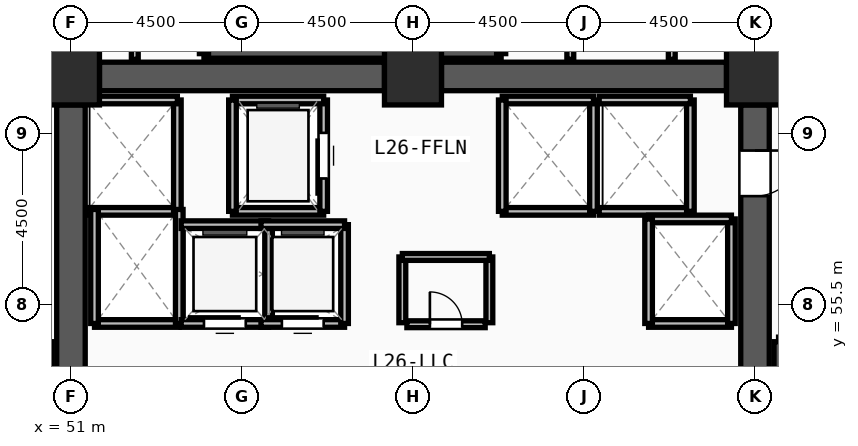
"""IFC4 building model, lengths in metres.
Left out: names, types, materials, properties, quantities, classifications, styles, units other than length and angle.
Written with IfcOpenShell. Run it as: python <this file> out.ifc"""

import sys

from ifc_helpers import new_model, si_unit, direction, frame, frame_2d, origin, origin_2d, place, context, subcontext, project, spatial, rectangle, extrude, source, transform, mapped, element, fill, save


model = new_model("IFC4")
c1 = context("Model", 3, precision=1e-05, world=origin(), true_north=direction((0.0, 1.0)))
c2 = subcontext(c1, "Body", "Model", "MODEL_VIEW")
j1 = project(units=[si_unit("LENGTHUNIT", "METRE"), si_unit("PLANEANGLEUNIT", "RADIAN")], contexts=[c1])
p1 = place(None, origin())
s1 = spatial("IfcSite", under=j1, at=p1, CompositionType="ELEMENT")
p2 = place(p1, origin())
s2 = spatial("IfcBuilding", under=s1, at=p2, CompositionType="ELEMENT")
p3 = place(p2, frame((0.0, 0.0, 102.0)))
s3 = spatial("IfcBuildingStorey", under=s2, at=p3, CompositionType="ELEMENT", Elevation=102.0)
m1 = source(origin(), c2, "Body", "SweptSolid", [
    extrude(rectangle(XDim=1.5, YDim=1.5, at=origin_2d()), origin(), (0.0, 0.0, 1.0), 3.75),
])
for number, where, z_axis, x_axis in (
    (1, (69.0, 61.5, 0.0), (0.0, 0.0, 1.0), (1.0, 0.0, 0.0)),
    (2, (60.0, 61.5, 0.0), (0.0, 0.0, 1.0), (1.0, 0.0, 0.0)),
    (3, (51.0, 61.5, 0.0), (0.0, 0.0, 1.0), (1.0, 0.0, 0.0)),
):
    element("IfcColumn", number, at=place(p3, frame(where, z_axis=z_axis, x_axis=x_axis)), inside=s3, PredefinedType="COLUMN", context=c2, shape_type="MappedRepresentation", body=[
        mapped(m1, transform((0.0, 0.0, 0.0), x_axis=(1.0, 0.0, 0.0), y_axis=(0.0, 1.0, 0.0), z_axis=(0.0, 0.0, 1.0), scale=1.0)),
    ])
for number, where, z_axis, x_axis in (
    (4, (51.75, 61.5, 0.0), (0.0, 0.0, 1.0), (1.0, 0.0, 0.0)),
    (5, (60.75, 61.5, 0.0), (0.0, 0.0, 1.0), (1.0, 0.0, 0.0)),
):
    element("IfcWall", number, at=place(p3, frame(where, z_axis=z_axis, x_axis=x_axis)), inside=s3, PredefinedType="SHEAR", context=c2, shape_type="SweptSolid", body=[
        extrude(rectangle(XDim=7.5, YDim=0.75, at=frame_2d((3.75, 0.0))), origin(), (0.0, 0.0, 1.0), 3.57),
    ])
p4 = place(p3, frame((69.0, 60.75, 0.0), z_axis=(0.0, 0.0, 1.0), x_axis=(0.0, -1.0, 0.0)))
e6 = element("IfcWall", 6, at=p4, inside=s3, PredefinedType="SHEAR", context=c2, shape_type="SweptSolid", body=[
    extrude(rectangle(XDim=13.5, YDim=0.75, at=frame_2d((6.75, 0.0))), origin(), (0.0, 0.0, 1.0), 3.57),
])
m2 = source(origin(), c2, "Body", "SweptSolid", [
    extrude(rectangle(XDim=1.2, YDim=2.2, at=frame_2d((0.6, 1.1))), frame((0.0, 0.385, 0.0), z_axis=(0.0, -1.0, 0.0), x_axis=(1.0, 0.0, 0.0)), (0.0, 0.0, 1.0), 0.77),
])
p5 = place(p4, frame((1.2, 0.0, 0.0)))
e7 = element("IfcOpeningElement", 7, at=p5, cuts=e6, PredefinedType="OPENING", context=c2, shape_type="MappedRepresentation", body=[
    mapped(m2, transform((0.0, 0.0, 0.0), x_axis=(1.0, 0.0, 0.0), y_axis=(0.0, 1.0, 0.0), z_axis=(0.0, 0.0, 1.0), scale=1.0)),
])
p6 = place(p3, frame((51.0, 47.25, 0.0), z_axis=(0.0, 0.0, 1.0), x_axis=(0.0, 1.0, 0.0)))
e8 = element("IfcWall", 8, at=p6, inside=s3, PredefinedType="SHEAR", context=c2, shape_type="SweptSolid", body=[
    extrude(rectangle(XDim=13.5, YDim=0.75, at=frame_2d((6.75, 0.0))), origin(), (0.0, 0.0, 1.0), 3.57),
])
for number, where, z_axis, x_axis in (
    (9, (69.62, 54.52, 0.0), (0.0, 0.0, 1.0), (0.0, -1.0, 0.0)),
    (10, (54.5, 62.1, 0.0), (0.0, 0.0, 1.0), (1.0, 0.0, 0.0)),
):
    element("IfcWall", number, at=place(p3, frame(where, z_axis=z_axis, x_axis=x_axis)), inside=s3, PredefinedType="SOLIDWALL", context=c2, shape_type="SweptSolid", body=[
        extrude(rectangle(XDim=7.82, YDim=0.24, at=frame_2d((3.91, 0.0))), origin(), (0.0, 0.0, 1.0), 3.57),
    ])
for number, where, z_axis, x_axis in (
    (11, (62.32, 62.1, 0.0), (0.0, 0.0, 1.0), (0.0, 1.0, 0.0)),
    (12, (54.5, 65.54, 0.0), (0.0, 0.0, 1.0), (0.0, -1.0, 0.0)),
):
    element("IfcWall", number, at=place(p3, frame(where, z_axis=z_axis, x_axis=x_axis)), inside=s3, PredefinedType="SOLIDWALL", context=c2, shape_type="SweptSolid", body=[
        extrude(rectangle(XDim=3.44, YDim=0.24, at=frame_2d((1.72, 0.0))), origin(), (0.0, 0.0, 1.0), 3.57),
    ])
p7 = place(p3, frame((55.25, 57.95, 0.0), z_axis=(0.0, 0.0, 1.0), x_axis=(1.0, 0.0, 0.0)))
e13 = element("IfcWall", 13, at=p7, inside=s3, PredefinedType="SOLIDWALL", context=c2, shape_type="SweptSolid", body=[
    extrude(rectangle(XDim=2.4, YDim=0.2, at=frame_2d((1.2, 0.0))), origin(), (0.0, 0.0, 1.0), 3.57),
])
p8 = place(p3, frame((57.65, 57.95, 0.0), z_axis=(0.0, 0.0, 1.0), x_axis=(0.0, 1.0, 0.0)))
e14 = element("IfcWall", 14, at=p8, inside=s3, PredefinedType="SOLIDWALL", context=c2, shape_type="SweptSolid", body=[
    extrude(rectangle(XDim=2.93, YDim=0.2, at=frame_2d((1.465, 0.0))), origin(), (0.0, 0.0, 1.0), 3.57),
])
m3 = source(origin(), c2, "Body", "SweptSolid", [
    extrude(rectangle(XDim=1.2, YDim=2.3, at=frame_2d((0.6, 1.15))), frame((0.0, 0.11, 0.0), z_axis=(0.0, -1.0, 0.0), x_axis=(1.0, 0.0, 0.0)), (0.0, 0.0, 1.0), 0.22),
])
p9 = place(p8, frame((0.865, 0.0, 0.0)))
e15 = element("IfcOpeningElement", 15, at=p9, cuts=e14, PredefinedType="OPENING", context=c2, shape_type="MappedRepresentation", body=[
    mapped(m3, transform((0.0, 0.0, 0.0), x_axis=(1.0, 0.0, 0.0), y_axis=(0.0, 1.0, 0.0), z_axis=(0.0, 0.0, 1.0), scale=1.0)),
])
p10 = place(p3, frame((57.65, 60.88, 0.0), z_axis=(0.0, 0.0, 1.0), x_axis=(-1.0, 0.0, 0.0)))
e16 = element("IfcWall", 16, at=p10, inside=s3, PredefinedType="SOLIDWALL", context=c2, shape_type="SweptSolid", body=[
    extrude(rectangle(XDim=2.4, YDim=0.2, at=frame_2d((1.2, 0.0))), origin(), (0.0, 0.0, 1.0), 3.57),
])
p11 = place(p3, frame((55.25, 60.88, 0.0), z_axis=(0.0, 0.0, 1.0), x_axis=(0.0, -1.0, 0.0)))
e17 = element("IfcWall", 17, at=p11, inside=s3, PredefinedType="SOLIDWALL", context=c2, shape_type="SweptSolid", body=[
    extrude(rectangle(XDim=2.93, YDim=0.2, at=frame_2d((1.465, 0.0))), origin(), (0.0, 0.0, 1.0), 3.57),
])
p12 = place(p3, frame((62.35, 57.95, 0.0), z_axis=(0.0, 0.0, 1.0), x_axis=(1.0, 0.0, 0.0)))
e18 = element("IfcWall", 18, at=p12, inside=s3, PredefinedType="SOLIDWALL", context=c2, shape_type="SweptSolid", body=[
    extrude(rectangle(XDim=2.4, YDim=0.2, at=frame_2d((1.2, 0.0))), origin(), (0.0, 0.0, 1.0), 3.57),
])
p13 = place(p3, frame((64.75, 57.95, 0.0), z_axis=(0.0, 0.0, 1.0), x_axis=(0.0, 1.0, 0.0)))
e19 = element("IfcWall", 19, at=p13, inside=s3, PredefinedType="SOLIDWALL", context=c2, shape_type="SweptSolid", body=[
    extrude(rectangle(XDim=2.93, YDim=0.2, at=frame_2d((1.465, 0.0))), origin(), (0.0, 0.0, 1.0), 3.57),
])
p14 = place(p3, frame((64.75, 60.88, 0.0), z_axis=(0.0, 0.0, 1.0), x_axis=(-1.0, 0.0, 0.0)))
e20 = element("IfcWall", 20, at=p14, inside=s3, PredefinedType="SOLIDWALL", context=c2, shape_type="SweptSolid", body=[
    extrude(rectangle(XDim=2.4, YDim=0.2, at=frame_2d((1.2, 0.0))), origin(), (0.0, 0.0, 1.0), 3.57),
])
p15 = place(p3, frame((62.35, 60.88, 0.0), z_axis=(0.0, 0.0, 1.0), x_axis=(0.0, -1.0, 0.0)))
e21 = element("IfcWall", 21, at=p15, inside=s3, PredefinedType="SOLIDWALL", context=c2, shape_type="SweptSolid", body=[
    extrude(rectangle(XDim=2.93, YDim=0.2, at=frame_2d((1.465, 0.0))), origin(), (0.0, 0.0, 1.0), 3.57),
])
p16 = place(p3, frame((64.9, 57.95, 0.0), z_axis=(0.0, 0.0, 1.0), x_axis=(1.0, 0.0, 0.0)))
e22 = element("IfcWall", 22, at=p16, inside=s3, PredefinedType="SOLIDWALL", context=c2, shape_type="SweptSolid", body=[
    extrude(rectangle(XDim=2.4, YDim=0.2, at=frame_2d((1.2, 0.0))), origin(), (0.0, 0.0, 1.0), 3.57),
])
p17 = place(p3, frame((67.3, 57.95, 0.0), z_axis=(0.0, 0.0, 1.0), x_axis=(0.0, 1.0, 0.0)))
e23 = element("IfcWall", 23, at=p17, inside=s3, PredefinedType="SOLIDWALL", context=c2, shape_type="SweptSolid", body=[
    extrude(rectangle(XDim=2.93, YDim=0.2, at=frame_2d((1.465, 0.0))), origin(), (0.0, 0.0, 1.0), 3.57),
])
for number, where, z_axis, x_axis in (
    (24, (67.3, 60.88, 0.0), (0.0, 0.0, 1.0), (-1.0, 0.0, 0.0)),
    (25, (51.4, 57.95, 0.0), (0.0, 0.0, 1.0), (1.0, 0.0, 0.0)),
):
    element("IfcWall", number, at=place(p3, frame(where, z_axis=z_axis, x_axis=x_axis)), inside=s3, PredefinedType="SOLIDWALL", context=c2, shape_type="SweptSolid", body=[
        extrude(rectangle(XDim=2.4, YDim=0.2, at=frame_2d((1.2, 0.0))), origin(), (0.0, 0.0, 1.0), 3.57),
    ])
p18 = place(p3, frame((53.8, 57.95, 0.0), z_axis=(0.0, 0.0, 1.0), x_axis=(0.0, 1.0, 0.0)))
e26 = element("IfcWall", 26, at=p18, inside=s3, PredefinedType="SOLIDWALL", context=c2, shape_type="SweptSolid", body=[
    extrude(rectangle(XDim=2.93, YDim=0.2, at=frame_2d((1.465, 0.0))), origin(), (0.0, 0.0, 1.0), 3.57),
])
p19 = place(p3, frame((53.8, 60.88, 0.0), z_axis=(0.0, 0.0, 1.0), x_axis=(-1.0, 0.0, 0.0)))
e27 = element("IfcWall", 27, at=p19, inside=s3, PredefinedType="SOLIDWALL", context=c2, shape_type="SweptSolid", body=[
    extrude(rectangle(XDim=2.4, YDim=0.2, at=frame_2d((1.2, 0.0))), origin(), (0.0, 0.0, 1.0), 3.57),
])
p20 = place(p3, frame((51.62, 55.0, 0.0), z_axis=(0.0, 0.0, 1.0), x_axis=(1.0, 0.0, 0.0)))
e28 = element("IfcWall", 28, at=p20, inside=s3, PredefinedType="SOLIDWALL", context=c2, shape_type="SweptSolid", body=[
    extrude(rectangle(XDim=2.23, YDim=0.2, at=frame_2d((1.115, 0.0))), origin(), (0.0, 0.0, 1.0), 3.57),
])
for number, where, z_axis, x_axis in (
    (29, (53.85, 55.0, 0.0), (0.0, 0.0, 1.0), (0.0, 1.0, 0.0)),
    (30, (51.62, 58.0, 0.0), (0.0, 0.0, 1.0), (0.0, -1.0, 0.0)),
):
    element("IfcWall", number, at=place(p3, frame(where, z_axis=z_axis, x_axis=x_axis)), inside=s3, PredefinedType="SOLIDWALL", context=c2, shape_type="SweptSolid", body=[
        extrude(rectangle(XDim=3.0, YDim=0.2, at=frame_2d((1.5, 0.0))), origin(), (0.0, 0.0, 1.0), 3.57),
    ])
p21 = place(p3, frame((66.2, 55.0, 0.0), z_axis=(0.0, 0.0, 1.0), x_axis=(1.0, 0.0, 0.0)))
e31 = element("IfcWall", 31, at=p21, inside=s3, PredefinedType="SOLIDWALL", context=c2, shape_type="SweptSolid", body=[
    extrude(rectangle(XDim=2.18, YDim=0.2, at=frame_2d((1.09, 0.0))), origin(), (0.0, 0.0, 1.0), 3.57),
])
p22 = place(p3, frame((68.38, 55.0, 0.0), z_axis=(0.0, 0.0, 1.0), x_axis=(0.0, 1.0, 0.0)))
e32 = element("IfcWall", 32, at=p22, inside=s3, PredefinedType="SOLIDWALL", context=c2, shape_type="SweptSolid", body=[
    extrude(rectangle(XDim=2.75, YDim=0.2, at=frame_2d((1.375, 0.0))), origin(), (0.0, 0.0, 1.0), 3.57),
])
p23 = place(p3, frame((68.38, 57.75, 0.0), z_axis=(0.0, 0.0, 1.0), x_axis=(-1.0, 0.0, 0.0)))
e33 = element("IfcWall", 33, at=p23, inside=s3, PredefinedType="SOLIDWALL", context=c2, shape_type="SweptSolid", body=[
    extrude(rectangle(XDim=2.18, YDim=0.2, at=frame_2d((1.09, 0.0))), origin(), (0.0, 0.0, 1.0), 3.57),
])
p24 = place(p3, frame((66.2, 57.75, 0.0), z_axis=(0.0, 0.0, 1.0), x_axis=(0.0, -1.0, 0.0)))
e34 = element("IfcWall", 34, at=p24, inside=s3, PredefinedType="SOLIDWALL", context=c2, shape_type="SweptSolid", body=[
    extrude(rectangle(XDim=2.75, YDim=0.2, at=frame_2d((1.375, 0.0))), origin(), (0.0, 0.0, 1.0), 3.57),
])
p25 = place(p3, frame((53.9, 55.0, 0.0), z_axis=(0.0, 0.0, 1.0), x_axis=(1.0, 0.0, 0.0)))
e35 = element("IfcWall", 35, at=p25, inside=s3, PredefinedType="SOLIDWALL", context=c2, shape_type="SweptSolid", body=[
    extrude(rectangle(XDim=2.3, YDim=0.2, at=frame_2d((1.15, 0.0))), origin(), (0.0, 0.0, 1.0), 3.57),
])
m4 = source(origin(), c2, "Body", "SweptSolid", [
    extrude(rectangle(XDim=1.1, YDim=2.2, at=frame_2d((0.55, 1.1))), frame((0.0, 0.11, 0.0), z_axis=(0.0, -1.0, 0.0), x_axis=(1.0, 0.0, 0.0)), (0.0, 0.0, 1.0), 0.22),
])
p26 = place(p25, frame((0.6, 0.0, 0.0)))
e36 = element("IfcOpeningElement", 36, at=p26, cuts=e35, PredefinedType="OPENING", context=c2, shape_type="MappedRepresentation", body=[
    mapped(m4, transform((0.0, 0.0, 0.0), x_axis=(1.0, 0.0, 0.0), y_axis=(0.0, 1.0, 0.0), z_axis=(0.0, 0.0, 1.0), scale=1.0)),
])
p27 = place(p3, frame((56.2, 55.0, 0.0), z_axis=(0.0, 0.0, 1.0), x_axis=(0.0, 1.0, 0.0)))
e37 = element("IfcWall", 37, at=p27, inside=s3, PredefinedType="SOLIDWALL", context=c2, shape_type="SweptSolid", body=[
    extrude(rectangle(XDim=2.6, YDim=0.2, at=frame_2d((1.3, 0.0))), origin(), (0.0, 0.0, 1.0), 3.57),
])
p28 = place(p3, frame((56.2, 57.6, 0.0), z_axis=(0.0, 0.0, 1.0), x_axis=(-1.0, 0.0, 0.0)))
e38 = element("IfcWall", 38, at=p28, inside=s3, PredefinedType="SOLIDWALL", context=c2, shape_type="SweptSolid", body=[
    extrude(rectangle(XDim=2.3, YDim=0.2, at=frame_2d((1.15, 0.0))), origin(), (0.0, 0.0, 1.0), 3.57),
])
p29 = place(p3, frame((56.0, 55.0, 0.0), z_axis=(0.0, 0.0, 1.0), x_axis=(1.0, 0.0, 0.0)))
e39 = element("IfcWall", 39, at=p29, inside=s3, PredefinedType="SOLIDWALL", context=c2, shape_type="SweptSolid", body=[
    extrude(rectangle(XDim=2.2, YDim=0.2, at=frame_2d((1.1, 0.0))), origin(), (0.0, 0.0, 1.0), 3.57),
])
p30 = place(p29, frame((0.55, 0.0, 0.0)))
e40 = element("IfcOpeningElement", 40, at=p30, cuts=e39, PredefinedType="OPENING", context=c2, shape_type="MappedRepresentation", body=[
    mapped(m4, transform((0.0, 0.0, 0.0), x_axis=(1.0, 0.0, 0.0), y_axis=(0.0, 1.0, 0.0), z_axis=(0.0, 0.0, 1.0), scale=1.0)),
])
p31 = place(p3, frame((58.2, 55.0, 0.0), z_axis=(0.0, 0.0, 1.0), x_axis=(0.0, 1.0, 0.0)))
e41 = element("IfcWall", 41, at=p31, inside=s3, PredefinedType="SOLIDWALL", context=c2, shape_type="SweptSolid", body=[
    extrude(rectangle(XDim=2.6, YDim=0.2, at=frame_2d((1.3, 0.0))), origin(), (0.0, 0.0, 1.0), 3.57),
])
p32 = place(p3, frame((58.2, 57.6, 0.0), z_axis=(0.0, 0.0, 1.0), x_axis=(-1.0, 0.0, 0.0)))
e42 = element("IfcWall", 42, at=p32, inside=s3, PredefinedType="SOLIDWALL", context=c2, shape_type="SweptSolid", body=[
    extrude(rectangle(XDim=2.2, YDim=0.2, at=frame_2d((1.1, 0.0))), origin(), (0.0, 0.0, 1.0), 3.57),
])
p33 = place(p3, frame((59.84, 54.98, 0.0), z_axis=(0.0, 0.0, 1.0), x_axis=(1.0, 0.0, 0.0)))
e43 = element("IfcWall", 43, at=p33, inside=s3, PredefinedType="PARTITIONING", context=c2, shape_type="SweptSolid", body=[
    extrude(rectangle(XDim=2.06, YDim=0.18, at=frame_2d((1.03, 0.0))), origin(), (0.0, 0.0, 1.0), 3.57),
])
m5 = source(origin(), c2, "Body", "SweptSolid", [
    extrude(rectangle(XDim=0.85, YDim=2.1, at=frame_2d((0.425, 1.05))), frame((0.0, 0.1, 0.0), z_axis=(0.0, -1.0, 0.0), x_axis=(1.0, 0.0, 0.0)), (0.0, 0.0, 1.0), 0.2),
])
p34 = place(p33, frame((0.605, 0.0, 0.0)))
e44 = element("IfcOpeningElement", 44, at=p34, cuts=e43, PredefinedType="OPENING", context=c2, shape_type="MappedRepresentation", body=[
    mapped(m5, transform((0.0, 0.0, 0.0), x_axis=(1.0, 0.0, 0.0), y_axis=(0.0, 1.0, 0.0), z_axis=(0.0, 0.0, 1.0), scale=1.0)),
])
for number, where, z_axis, x_axis in (
    (45, (59.72, 55.02, 0.0), (0.0, 0.0, 1.0), (0.0, 1.0, 0.0)),
    (46, (62.01, 55.02, 0.0), (0.0, 0.0, 1.0), (0.0, 1.0, 0.0)),
):
    element("IfcWall", number, at=place(p3, frame(where, z_axis=z_axis, x_axis=x_axis)), inside=s3, PredefinedType="PARTITIONING", context=c2, shape_type="SweptSolid", body=[
        extrude(rectangle(XDim=1.73, YDim=0.18, at=frame_2d((0.865, 0.0))), origin(), (0.0, 0.0, 1.0), 3.57),
    ])
p35 = place(p3, frame((59.72, 56.75, 0.0), z_axis=(0.0, 0.0, 1.0), x_axis=(1.0, 0.0, 0.0)))
e47 = element("IfcWall", 47, at=p35, inside=s3, PredefinedType="PARTITIONING", context=c2, shape_type="SweptSolid", body=[
    extrude(rectangle(XDim=2.29, YDim=0.18, at=frame_2d((1.145, 0.0))), origin(), (0.0, 0.0, 1.0), 3.57),
])
for number, where, z_axis, x_axis in (
    (48, (50.54, 61.95, 0.0), (0.0, 0.0, 1.0), (0.0, 1.0, 0.0)),
    (49, (52.68, 61.95, 0.0), (0.0, 0.0, 1.0), (0.0, 1.0, 0.0)),
    (50, (64.14, 61.95, 0.0), (0.0, 0.0, 1.0), (0.0, 1.0, 0.0)),
    (51, (66.81, 61.95, 0.0), (0.0, 0.0, 1.0), (0.0, 1.0, 0.0)),
):
    element("IfcWall", number, at=place(p3, frame(where, z_axis=z_axis, x_axis=x_axis)), inside=s3, PredefinedType="PARTITIONING", context=c2, shape_type="SweptSolid", body=[
        extrude(rectangle(XDim=3.63, YDim=0.18, at=frame_2d((1.815, 0.0))), origin(), (0.0, 0.0, 1.0), 3.57),
    ])
m6 = source(origin(), c2, "Body", "SweptSolid", [
    extrude(rectangle(XDim=1.2, YDim=2.2, at=frame_2d((0.6, 1.1))), frame((0.0, 0.025, 0.0), z_axis=(0.0, -1.0, 0.0), x_axis=(1.0, 0.0, 0.0)), (0.0, 0.0, 1.0), 0.05),
])
p36 = place(p5, origin())
e52 = element("IfcDoor", 52, at=p36, inside=s3, OperationType="SINGLE_SWING_LEFT", PredefinedType="DOOR", context=c2, shape_type="MappedRepresentation", body=[
    mapped(m6, transform((0.0, 0.0, 0.0), x_axis=(1.0, 0.0, 0.0), y_axis=(0.0, 1.0, 0.0), z_axis=(0.0, 0.0, 1.0), scale=1.0)),
])
fill(e7, e52)
m7 = source(origin(), c2, "Body", "SweptSolid", [
    extrude(rectangle(XDim=1.2, YDim=2.3, at=frame_2d((0.6, 1.15))), frame((0.0, 0.025, 0.0), z_axis=(0.0, -1.0, 0.0), x_axis=(1.0, 0.0, 0.0)), (0.0, 0.0, 1.0), 0.05),
])
p37 = place(p9, origin())
e53 = element("IfcDoor", 53, at=p37, inside=s3, OperationType="SLIDING_TO_LEFT", PredefinedType="DOOR", context=c2, shape_type="MappedRepresentation", body=[
    mapped(m7, transform((0.0, 0.0, 0.0), x_axis=(1.0, 0.0, 0.0), y_axis=(0.0, 1.0, 0.0), z_axis=(0.0, 0.0, 1.0), scale=1.0)),
])
fill(e15, e53)
m8 = source(origin(), c2, "Body", "SweptSolid", [
    extrude(rectangle(XDim=1.1, YDim=2.2, at=frame_2d((0.55, 1.1))), frame((0.0, 0.025, 0.0), z_axis=(0.0, -1.0, 0.0), x_axis=(1.0, 0.0, 0.0)), (0.0, 0.0, 1.0), 0.05),
])
p38 = place(p26, origin())
e54 = element("IfcDoor", 54, at=p38, inside=s3, OperationType="SLIDING_TO_LEFT", PredefinedType="DOOR", context=c2, shape_type="MappedRepresentation", body=[
    mapped(m8, transform((0.0, 0.0, 0.0), x_axis=(1.0, 0.0, 0.0), y_axis=(0.0, 1.0, 0.0), z_axis=(0.0, 0.0, 1.0), scale=1.0)),
])
fill(e36, e54)
p39 = place(p30, origin())
e55 = element("IfcDoor", 55, at=p39, inside=s3, OperationType="SLIDING_TO_LEFT", PredefinedType="DOOR", context=c2, shape_type="MappedRepresentation", body=[
    mapped(m8, transform((0.0, 0.0, 0.0), x_axis=(1.0, 0.0, 0.0), y_axis=(0.0, 1.0, 0.0), z_axis=(0.0, 0.0, 1.0), scale=1.0)),
])
fill(e40, e55)
m9 = source(origin(), c2, "Body", "SweptSolid", [
    extrude(rectangle(XDim=0.85, YDim=2.1, at=frame_2d((0.425, 1.05))), frame((0.0, 0.025, 0.0), z_axis=(0.0, -1.0, 0.0), x_axis=(1.0, 0.0, 0.0)), (0.0, 0.0, 1.0), 0.05),
])
p40 = place(p34, origin())
e56 = element("IfcDoor", 56, at=p40, inside=s3, OperationType="SINGLE_SWING_LEFT", PredefinedType="DOOR", context=c2, shape_type="MappedRepresentation", body=[
    mapped(m9, transform((0.0, 0.0, 0.0), x_axis=(1.0, 0.0, 0.0), y_axis=(0.0, 1.0, 0.0), z_axis=(0.0, 0.0, 1.0), scale=1.0)),
])
fill(e44, e56)
save(model, sys.argv[1])
